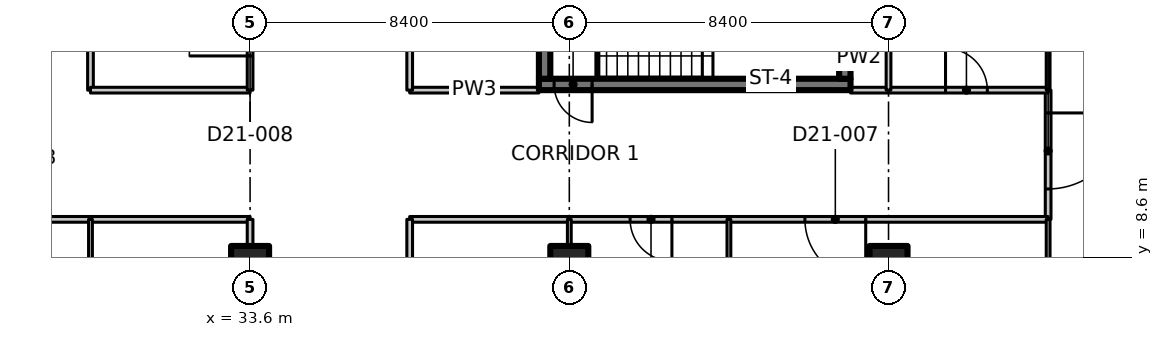
"""IFC4 building model, lengths in metres.
Left out: names, types, materials, properties, quantities, classifications, styles, units other than length and angle.
Written with IfcOpenShell. Run it as: python <this file> out.ifc"""

import sys

from ifc_helpers import new_model, si_unit, direction, frame, frame_2d, origin, origin_2d, place, context, subcontext, project, spatial, polyline, rectangle, outline, extrude, element, fill, save


model = new_model("IFC4")
c1 = context("Model", 3, precision=1e-05, world=origin(), true_north=direction((0.0, 1.0)))
c2 = subcontext(c1, "Body", "Model", "MODEL_VIEW")
j1 = project(units=[si_unit("LENGTHUNIT", "METRE"), si_unit("PLANEANGLEUNIT", "RADIAN")], contexts=[c1])
p1 = place(None, origin())
s1 = spatial("IfcSite", under=j1, at=p1, CompositionType="ELEMENT")
p2 = place(p1, origin())
s2 = spatial("IfcBuilding", under=s1, at=p2, CompositionType="ELEMENT")
p3 = place(p2, frame((0.0, 0.0, 170.4)))
s3 = spatial("IfcBuildingStorey", under=s2, at=p3, CompositionType="ELEMENT", Elevation=170.4)
for number, where, z_axis, x_axis in (
    (1, (33.6, 8.4, 0.0), (0.0, 0.0, 1.0), (1.0, 0.0, 0.0)),
    (2, (42.0, 8.4, 0.0), (0.0, 0.0, 1.0), (1.0, 0.0, 0.0)),
    (3, (50.4, 8.4, 0.0), (0.0, 0.0, 1.0), (1.0, 0.0, 0.0)),
):
    element("IfcColumn", number, at=place(p3, frame(where, z_axis=z_axis, x_axis=x_axis)), inside=s3, PredefinedType="COLUMN", context=c2, shape_type="SweptSolid", body=[
        extrude(rectangle(XDim=1.0, YDim=1.0, at=origin_2d()), origin(), (0.0, 0.0, 1.0), 3.35),
    ])
p4 = place(p3, frame((49.4, 13.15, 0.0), z_axis=(0.0, 0.0, 1.0), x_axis=(-1.0, 0.0, 0.0)))
e4 = element("IfcWall", 4, at=p4, inside=s3, PredefinedType="SHEAR", context=c2, shape_type="SweptSolid", body=[
    extrude(rectangle(XDim=8.2, YDim=0.3, at=frame_2d((4.1, 0.0))), origin(), (0.0, 0.0, 1.0), 3.35),
])
p5 = place(p4, frame((6.8, 0.0, 0.0)))
e5 = element("IfcOpeningElement", 5, at=p5, cuts=e4, PredefinedType="OPENING", context=c2, shape_type="SweptSolid", body=[
    extrude(rectangle(XDim=1.0, YDim=2.1, at=frame_2d((0.5, 1.05))), frame((0.0, 0.16, 0.0), z_axis=(0.0, -1.0, 0.0), x_axis=(1.0, 0.0, 0.0)), (0.0, 0.0, 1.0), 0.32),
])
for number, where, z_axis, x_axis in (
    (6, (41.35, 13.3, 0.0), (0.0, 0.0, 1.0), (0.0, 1.0, 0.0)),
    (7, (49.25, 13.3, 0.0), (0.0, 0.0, 1.0), (0.0, 1.0, 0.0)),
):
    element("IfcWall", number, at=place(p3, frame(where, z_axis=z_axis, x_axis=x_axis)), inside=s3, PredefinedType="SHEAR", context=c2, shape_type="SweptSolid", body=[
        extrude(rectangle(XDim=2.55, YDim=0.3, at=frame_2d((1.275, 0.0))), origin(), (0.0, 0.0, 1.0), 3.35),
    ])
p6 = place(p3, frame((29.4, 9.6, 0.0), z_axis=(0.0, 0.0, 1.0), x_axis=(-1.0, 0.0, 0.0)))
e8 = element("IfcWall", 8, at=p6, inside=s3, PredefinedType="PARTITIONING", context=c2, shape_type="SweptSolid", body=[
    extrude(rectangle(XDim=4.2, YDim=0.15, at=frame_2d((2.1, 0.0))), origin(), (0.0, 0.0, 1.0), 3.33),
])
p7 = place(p6, frame((1.5, 0.0, 0.0)))
e9 = element("IfcOpeningElement", 9, at=p7, cuts=e8, PredefinedType="OPENING", context=c2, shape_type="SweptSolid", body=[
    extrude(rectangle(XDim=1.1, YDim=2.1, at=frame_2d((0.55, 1.05))), frame((0.0, 0.085, 0.0), z_axis=(0.0, -1.0, 0.0), x_axis=(1.0, 0.0, 0.0)), (0.0, 0.0, 1.0), 0.17),
])
p8 = place(p3, frame((29.4, 21.2, 0.0), z_axis=(0.0, 0.0, 1.0), x_axis=(0.0, -1.0, 0.0)))
e10 = element("IfcWall", 10, at=p8, inside=s3, PredefinedType="PARTITIONING", context=c2, shape_type="SweptSolid", body=[
    extrude(rectangle(XDim=8.2, YDim=0.15, at=frame_2d((4.1, 0.0))), origin(), (0.0, 0.0, 1.0), 3.33),
])
p9 = place(p3, frame((54.6, 13.0, 0.0), z_axis=(0.0, 0.0, 1.0), x_axis=(0.0, -1.0, 0.0)))
e11 = element("IfcWall", 11, at=p9, inside=s3, PredefinedType="PARTITIONING", context=c2, shape_type="SweptSolid", body=[
    extrude(rectangle(XDim=3.4, YDim=0.15, at=frame_2d((1.7, 0.0))), origin(), (0.0, 0.0, 1.0), 3.33),
])
p10 = place(p9, frame((0.6, 0.0, 0.0)))
e12 = element("IfcOpeningElement", 12, at=p10, cuts=e11, PredefinedType="OPENING", context=c2, shape_type="SweptSolid", body=[
    extrude(rectangle(XDim=2.0, YDim=2.4, at=frame_2d((1.0, 1.2))), frame((0.0, 0.085, 0.0), z_axis=(0.0, -1.0, 0.0), x_axis=(1.0, 0.0, 0.0)), (0.0, 0.0, 1.0), 0.17),
])
p11 = place(p3, frame((33.6, 9.6, 0.0), z_axis=(0.0, 0.0, 1.0), x_axis=(-1.0, 0.0, 0.0)))
e13 = element("IfcWall", 13, at=p11, inside=s3, PredefinedType="PARTITIONING", context=c2, shape_type="SweptSolid", body=[
    extrude(rectangle(XDim=4.2, YDim=0.15, at=frame_2d((2.1, 0.0))), origin(), (0.0, 0.0, 1.0), 3.33),
])
p12 = place(p3, frame((42.0, 9.6, 0.0), z_axis=(0.0, 0.0, 1.0), x_axis=(-1.0, 0.0, 0.0)))
e14 = element("IfcWall", 14, at=p12, inside=s3, PredefinedType="PARTITIONING", context=c2, shape_type="SweptSolid", body=[
    extrude(rectangle(XDim=4.2, YDim=0.15, at=frame_2d((2.1, 0.0))), origin(), (0.0, 0.0, 1.0), 3.33),
])
p13 = place(p3, frame((46.2, 9.6, 0.0), z_axis=(0.0, 0.0, 1.0), x_axis=(-1.0, 0.0, 0.0)))
e15 = element("IfcWall", 15, at=p13, inside=s3, PredefinedType="PARTITIONING", context=c2, shape_type="SweptSolid", body=[
    extrude(rectangle(XDim=4.2, YDim=0.15, at=frame_2d((2.1, 0.0))), origin(), (0.0, 0.0, 1.0), 3.33),
])
p14 = place(p13, frame((1.5, 0.0, 0.0)))
e16 = element("IfcOpeningElement", 16, at=p14, cuts=e15, PredefinedType="OPENING", context=c2, shape_type="SweptSolid", body=[
    extrude(rectangle(XDim=1.1, YDim=2.1, at=frame_2d((0.55, 1.05))), frame((0.0, 0.085, 0.0), z_axis=(0.0, -1.0, 0.0), x_axis=(1.0, 0.0, 0.0)), (0.0, 0.0, 1.0), 0.17),
])
p15 = place(p3, frame((54.6, 9.6, 0.0), z_axis=(0.0, 0.0, 1.0), x_axis=(-1.0, 0.0, 0.0)))
e17 = element("IfcWall", 17, at=p15, inside=s3, PredefinedType="PARTITIONING", context=c2, shape_type="SweptSolid", body=[
    extrude(rectangle(XDim=8.4, YDim=0.15, at=frame_2d((4.2, 0.0))), origin(), (0.0, 0.0, 1.0), 3.33),
])
p16 = place(p15, frame((4.8, 0.0, 0.0)))
e18 = element("IfcOpeningElement", 18, at=p16, cuts=e17, PredefinedType="OPENING", context=c2, shape_type="SweptSolid", body=[
    extrude(rectangle(XDim=1.6, YDim=2.1, at=frame_2d((0.8, 1.05))), frame((0.0, 0.085, 0.0), z_axis=(0.0, -1.0, 0.0), x_axis=(1.0, 0.0, 0.0)), (0.0, 0.0, 1.0), 0.17),
])
p17 = place(p3, frame((29.4, 13.0, 0.0), z_axis=(0.0, 0.0, 1.0), x_axis=(1.0, 0.0, 0.0)))
e19 = element("IfcWall", 19, at=p17, inside=s3, PredefinedType="PARTITIONING", context=c2, shape_type="SweptSolid", body=[
    extrude(rectangle(XDim=4.2, YDim=0.15, at=frame_2d((2.1, 0.0))), origin(), (0.0, 0.0, 1.0), 3.33),
])
p18 = place(p3, frame((37.8, 13.0, 0.0), z_axis=(0.0, 0.0, 1.0), x_axis=(1.0, 0.0, 0.0)))
e20 = element("IfcWall", 20, at=p18, inside=s3, PredefinedType="PARTITIONING", context=c2, shape_type="SweptSolid", body=[
    extrude(rectangle(XDim=3.4, YDim=0.15, at=frame_2d((1.7, 0.0))), origin(), (0.0, 0.0, 1.0), 3.33),
])
p19 = place(p3, frame((49.4, 13.0, 0.0), z_axis=(0.0, 0.0, 1.0), x_axis=(1.0, 0.0, 0.0)))
e21 = element("IfcWall", 21, at=p19, inside=s3, PredefinedType="PARTITIONING", context=c2, shape_type="SweptSolid", body=[
    extrude(rectangle(XDim=1.0, YDim=0.15, at=frame_2d((0.5, 0.0))), origin(), (0.0, 0.0, 1.0), 3.33),
])
p20 = place(p3, frame((50.4, 13.0, 0.0), z_axis=(0.0, 0.0, 1.0), x_axis=(1.0, 0.0, 0.0)))
e22 = element("IfcWall", 22, at=p20, inside=s3, PredefinedType="PARTITIONING", context=c2, shape_type="SweptSolid", body=[
    extrude(rectangle(XDim=4.2, YDim=0.15, at=frame_2d((2.1, 0.0))), origin(), (0.0, 0.0, 1.0), 3.33),
])
p21 = place(p20, frame((1.5, 0.0, 0.0)))
e23 = element("IfcOpeningElement", 23, at=p21, cuts=e22, PredefinedType="OPENING", context=c2, shape_type="SweptSolid", body=[
    extrude(rectangle(XDim=1.1, YDim=2.1, at=frame_2d((0.55, 1.05))), frame((0.0, 0.085, 0.0), z_axis=(0.0, -1.0, 0.0), x_axis=(1.0, 0.0, 0.0)), (0.0, 0.0, 1.0), 0.17),
])
p22 = place(p3, frame((54.6, -0.2, 0.0), z_axis=(0.0, 0.0, 1.0), x_axis=(0.0, 1.0, 0.0)))
e24 = element("IfcWall", 24, at=p22, inside=s3, PredefinedType="PARTITIONING", context=c2, shape_type="SweptSolid", body=[
    extrude(outline(polyline([(0.0, 0.0), (9.8, 0.0), (9.8, 3.33), (5.066, 3.33), (5.064, 2.98), (3.736, 2.98), (3.734, 3.33), (0.0, 3.33), (0.0, 0.0)])), frame((0.0, 0.05, 0.0), z_axis=(0.0, -1.0, 0.0), x_axis=(1.0, 0.0, 0.0)), (0.0, 0.0, 1.0), 0.1),
])
p23 = place(p3, frame((54.6, 13.0, 0.0), z_axis=(0.0, 0.0, 1.0), x_axis=(0.0, 1.0, 0.0)))
e25 = element("IfcWall", 25, at=p23, inside=s3, PredefinedType="PARTITIONING", context=c2, shape_type="SweptSolid", body=[
    extrude(outline(polyline([(0.0, 0.0), (12.502, 0.0), (12.502, 3.33), (12.4, 3.33), (8.666, 3.33), (8.664, 2.98), (7.336, 2.98), (7.334, 3.33), (0.0, 3.33), (0.0, 0.0)])), frame((0.0, 0.05, 0.0), z_axis=(0.0, -1.0, 0.0), x_axis=(1.0, 0.0, 0.0)), (0.0, 0.0, 1.0), 0.1),
])
p24 = place(p3, frame((33.6, 8.92, 0.0), z_axis=(0.0, 0.0, 1.0), x_axis=(0.0, 1.0, 0.0)))
e26 = element("IfcWall", 26, at=p24, inside=s3, PredefinedType="PARTITIONING", context=c2, shape_type="SweptSolid", body=[
    extrude(rectangle(XDim=0.68, YDim=0.15, at=frame_2d((0.34, 0.0))), origin(), (0.0, 0.0, 1.0), 3.33),
])
p25 = place(p3, frame((37.8, 9.6, 0.0), z_axis=(0.0, 0.0, 1.0), x_axis=(0.0, -1.0, 0.0)))
e27 = element("IfcWall", 27, at=p25, inside=s3, PredefinedType="PARTITIONING", context=c2, shape_type="SweptSolid", body=[
    extrude(outline(polyline([(0.0, 0.0), (10.965, 0.0), (10.965, 3.33), (10.7, 3.33), (10.05, 3.33), (10.048, 2.98), (9.152, 2.98), (9.15, 3.33), (0.0, 3.33), (0.0, 0.0)])), frame((0.0, 0.075, 0.0), z_axis=(0.0, -1.0, 0.0), x_axis=(1.0, 0.0, 0.0)), (0.0, 0.0, 1.0), 0.15),
])
p26 = place(p25, frame((4.8, 0.0, 0.0)))
e28 = element("IfcOpeningElement", 28, at=p26, cuts=e27, PredefinedType="OPENING", context=c2, shape_type="SweptSolid", body=[
    extrude(rectangle(XDim=1.1, YDim=2.1, at=frame_2d((0.55, 1.05))), frame((0.0, 0.085, 0.0), z_axis=(0.0, -1.0, 0.0), x_axis=(1.0, 0.0, 0.0)), (0.0, 0.0, 1.0), 0.17),
])
p27 = place(p3, frame((29.4, 9.6, 0.0), z_axis=(0.0, 0.0, 1.0), x_axis=(0.0, -1.0, 0.0)))
e29 = element("IfcWall", 29, at=p27, inside=s3, PredefinedType="PARTITIONING", context=c2, shape_type="SweptSolid", body=[
    extrude(outline(polyline([(0.0, 0.0), (10.965, 0.0), (10.965, 3.33), (10.7, 3.33), (10.05, 3.33), (10.048, 2.98), (9.152, 2.98), (9.15, 3.33), (0.0, 3.33), (0.0, 0.0)])), frame((0.0, 0.05, 0.0), z_axis=(0.0, -1.0, 0.0), x_axis=(1.0, 0.0, 0.0)), (0.0, 0.0, 1.0), 0.1),
])
p28 = place(p3, frame((42.0, 9.6, 0.0), z_axis=(0.0, 0.0, 1.0), x_axis=(0.0, -1.0, 0.0)))
e30 = element("IfcWall", 30, at=p28, inside=s3, PredefinedType="PARTITIONING", context=c2, shape_type="SweptSolid", body=[
    extrude(rectangle(XDim=0.68, YDim=0.1, at=frame_2d((0.34, 0.0))), origin(), (0.0, 0.0, 1.0), 3.33),
])
p29 = place(p3, frame((46.2, 9.6, 0.0), z_axis=(0.0, 0.0, 1.0), x_axis=(0.0, -1.0, 0.0)))
e31 = element("IfcWall", 31, at=p29, inside=s3, PredefinedType="PARTITIONING", context=c2, shape_type="SweptSolid", body=[
    extrude(outline(polyline([(0.0, 0.0), (10.965, 0.0), (10.965, 3.33), (10.7, 3.33), (10.05, 3.33), (10.048, 2.98), (9.152, 2.98), (9.15, 3.33), (0.0, 3.33), (0.0, 0.0)])), frame((0.0, 0.05, 0.0), z_axis=(0.0, -1.0, 0.0), x_axis=(1.0, 0.0, 0.0)), (0.0, 0.0, 1.0), 0.1),
])
p30 = place(p3, frame((33.6, 13.0, 0.0), z_axis=(0.0, 0.0, 1.0), x_axis=(0.0, 1.0, 0.0)))
e32 = element("IfcWall", 32, at=p30, inside=s3, PredefinedType="PARTITIONING", context=c2, shape_type="SweptSolid", body=[
    extrude(rectangle(XDim=3.28, YDim=0.15, at=frame_2d((1.64, 0.0))), origin(), (0.0, 0.0, 1.0), 3.33),
])
p31 = place(p30, frame((0.9, 0.0, 0.0)))
e33 = element("IfcOpeningElement", 33, at=p31, cuts=e32, PredefinedType="OPENING", context=c2, shape_type="SweptSolid", body=[
    extrude(rectangle(XDim=1.6, YDim=2.1, at=frame_2d((0.8, 1.05))), frame((0.0, 0.085, 0.0), z_axis=(0.0, -1.0, 0.0), x_axis=(1.0, 0.0, 0.0)), (0.0, 0.0, 1.0), 0.17),
])
p32 = place(p3, frame((37.8, 30.243, 0.0), z_axis=(0.0, 0.0, 1.0), x_axis=(0.0, -1.0, 0.0)))
e34 = element("IfcWall", 34, at=p32, inside=s3, PredefinedType="PARTITIONING", context=c2, shape_type="SweptSolid", body=[
    extrude(outline(polyline([(0.0, 0.0), (17.243, 0.0), (17.243, 3.33), (5.493, 3.33), (5.491, 2.98), (4.595, 2.98), (4.593, 3.33), (0.0, 3.33), (0.0, 0.0)])), frame((0.0, 0.075, 0.0), z_axis=(0.0, -1.0, 0.0), x_axis=(1.0, 0.0, 0.0)), (0.0, 0.0, 1.0), 0.15),
])
p33 = place(p32, frame((8.0, 0.0, 0.0)))
e35 = element("IfcOpeningElement", 35, at=p33, cuts=e34, PredefinedType="OPENING", context=c2, shape_type="SweptSolid", body=[
    extrude(rectangle(XDim=1.6, YDim=2.1, at=frame_2d((0.8, 1.05))), frame((0.0, 0.085, 0.0), z_axis=(0.0, -1.0, 0.0), x_axis=(1.0, 0.0, 0.0)), (0.0, 0.0, 1.0), 0.17),
])
p34 = place(p3, frame((50.4, 16.28, 0.0), z_axis=(0.0, 0.0, 1.0), x_axis=(0.0, -1.0, 0.0)))
e36 = element("IfcWall", 36, at=p34, inside=s3, PredefinedType="PARTITIONING", context=c2, shape_type="SweptSolid", body=[
    extrude(rectangle(XDim=3.28, YDim=0.125, at=frame_2d((1.64, 0.0))), origin(), (0.0, 0.0, 1.0), 3.33),
])
p35 = place(p5, origin())
e37 = element("IfcDoor", 37, at=p35, inside=s3, OperationType="SINGLE_SWING_RIGHT", PredefinedType="DOOR", context=c2, shape_type="SweptSolid", body=[
    extrude(rectangle(XDim=1.0, YDim=2.1, at=frame_2d((0.5, 1.05))), frame((0.0, 0.025, 0.0), z_axis=(0.0, -1.0, 0.0), x_axis=(1.0, 0.0, 0.0)), (0.0, 0.0, 1.0), 0.05),
])
fill(e5, e37)
p36 = place(p10, origin())
e38 = element("IfcDoor", 38, at=p36, inside=s3, OperationType="DOUBLE_DOOR_SINGLE_SWING", PredefinedType="DOOR", context=c2, shape_type="SweptSolid", body=[
    extrude(rectangle(XDim=2.0, YDim=2.4, at=frame_2d((1.0, 1.2))), frame((0.0, 0.025, 0.0), z_axis=(0.0, -1.0, 0.0), x_axis=(1.0, 0.0, 0.0)), (0.0, 0.0, 1.0), 0.05),
])
fill(e12, e38)
p37 = place(p14, origin())
e39 = element("IfcDoor", 39, at=p37, inside=s3, OperationType="SINGLE_SWING_LEFT", PredefinedType="DOOR", context=c2, shape_type="SweptSolid", body=[
    extrude(rectangle(XDim=1.1, YDim=2.1, at=frame_2d((0.55, 1.05))), frame((0.0, 0.025, 0.0), z_axis=(0.0, -1.0, 0.0), x_axis=(1.0, 0.0, 0.0)), (0.0, 0.0, 1.0), 0.05),
])
fill(e16, e39)
p38 = place(p16, origin())
e40 = element("IfcDoor", 40, at=p38, inside=s3, OperationType="DOUBLE_DOOR_SINGLE_SWING", PredefinedType="DOOR", context=c2, shape_type="SweptSolid", body=[
    extrude(rectangle(XDim=1.6, YDim=2.1, at=frame_2d((0.8, 1.05))), frame((0.0, 0.025, 0.0), z_axis=(0.0, -1.0, 0.0), x_axis=(1.0, 0.0, 0.0)), (0.0, 0.0, 1.0), 0.05),
])
fill(e18, e40)
p39 = place(p31, origin())
e41 = element("IfcDoor", 41, at=p39, inside=s3, OperationType="DOUBLE_DOOR_SINGLE_SWING", PredefinedType="DOOR", context=c2, shape_type="SweptSolid", body=[
    extrude(rectangle(XDim=1.6, YDim=2.1, at=frame_2d((0.8, 1.05))), frame((0.0, 0.025, 0.0), z_axis=(0.0, -1.0, 0.0), x_axis=(1.0, 0.0, 0.0)), (0.0, 0.0, 1.0), 0.05),
])
fill(e33, e41)
p40 = place(p21, origin())
e42 = element("IfcDoor", 42, at=p40, inside=s3, OperationType="SINGLE_SWING_LEFT", PredefinedType="DOOR", context=c2, shape_type="SweptSolid", body=[
    extrude(rectangle(XDim=1.1, YDim=2.1, at=frame_2d((0.55, 1.05))), frame((0.0, 0.025, 0.0), z_axis=(0.0, -1.0, 0.0), x_axis=(1.0, 0.0, 0.0)), (0.0, 0.0, 1.0), 0.05),
])
fill(e23, e42)
save(model, sys.argv[1])
